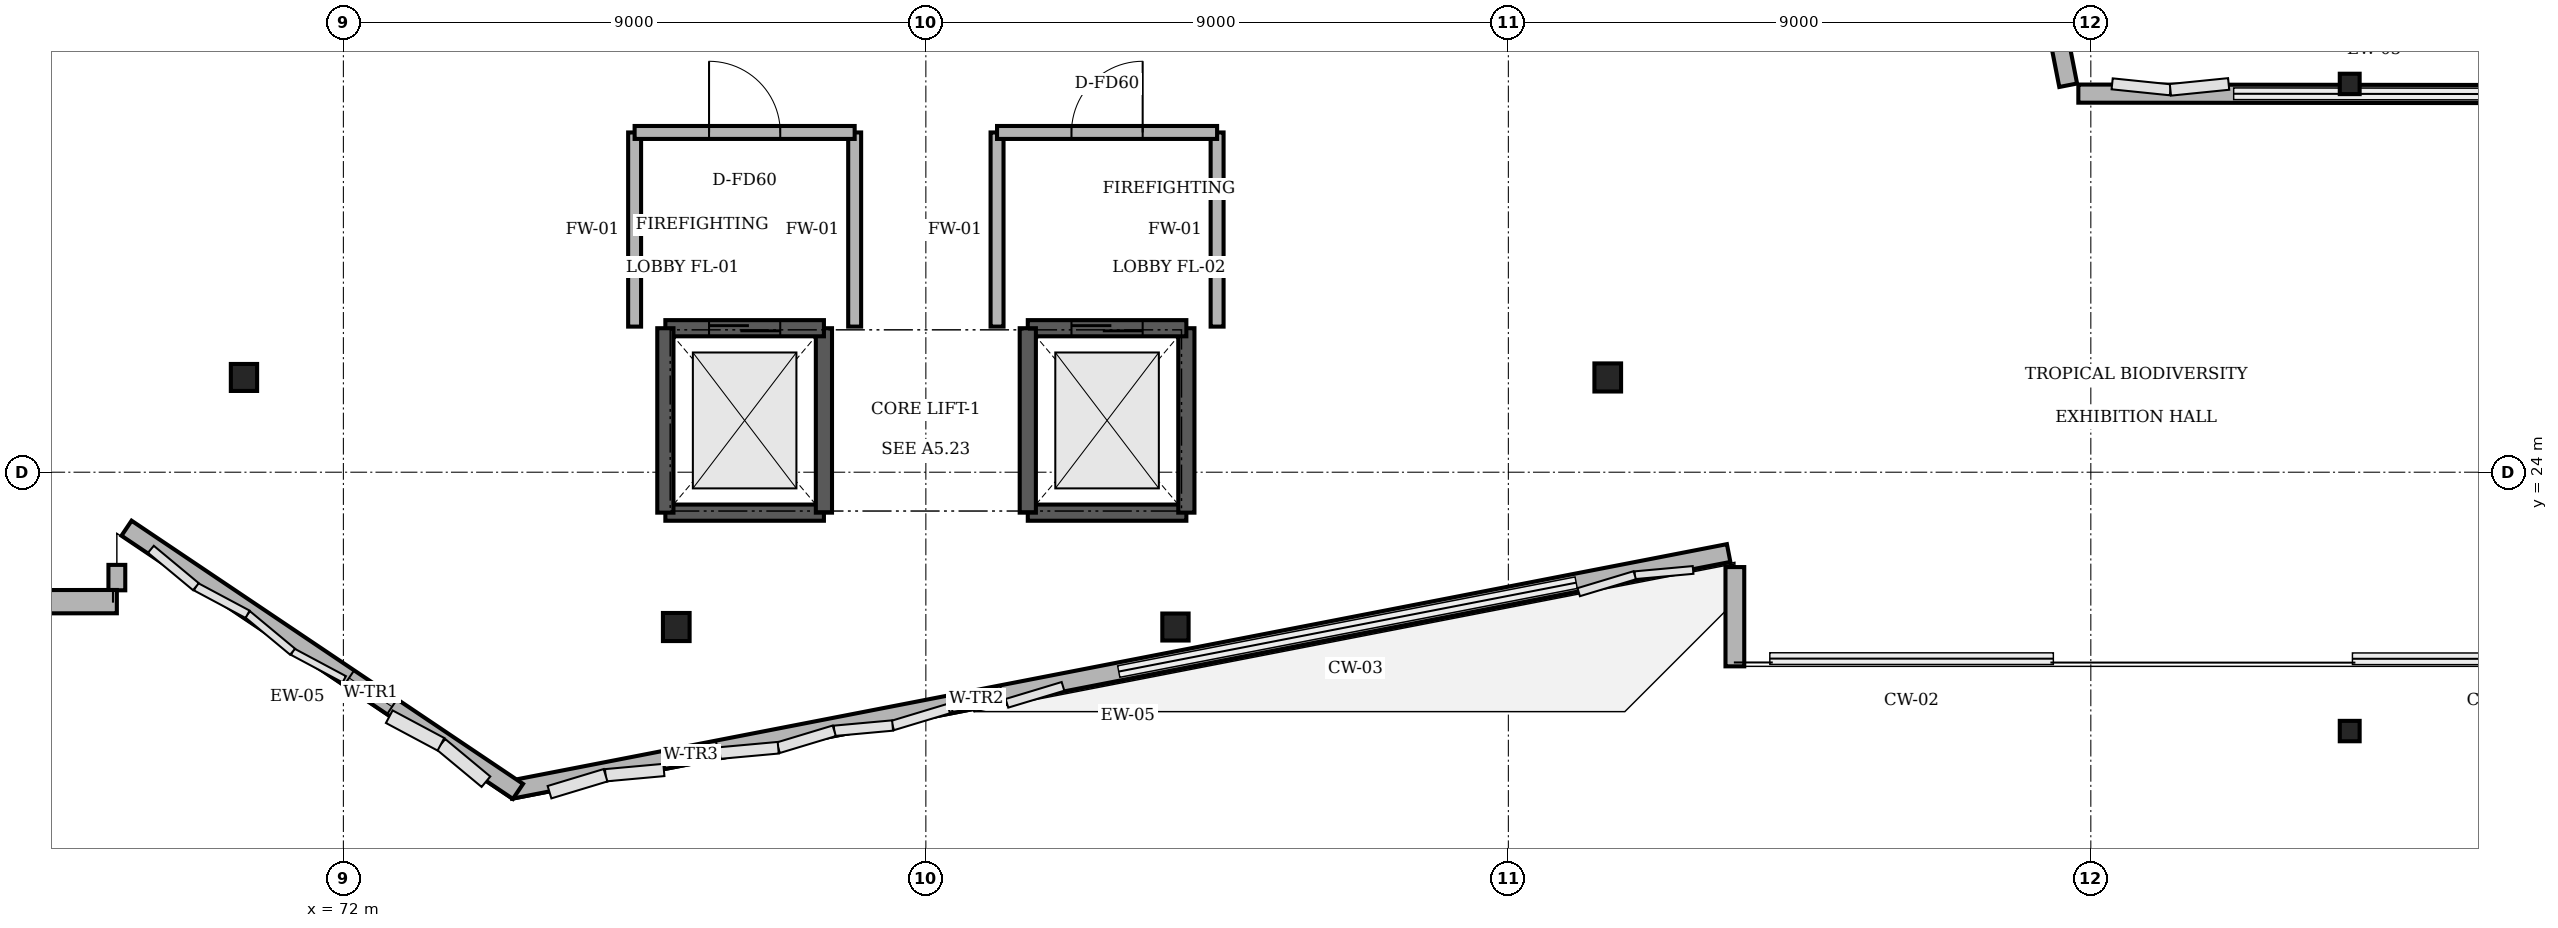
"""IFC4 building model, lengths in metres.
Left out: names, types, materials, properties, quantities, classifications, styles, units other than length and angle.
Written with IfcOpenShell. Run it as: python <this file> out.ifc"""

import sys

from ifc_helpers import new_model, si_unit, direction, frame, frame_2d, origin, origin_2d, place, context, subcontext, project, spatial, rectangle, i_section, extrude, element, fill, save


model = new_model("IFC4")
c1 = context("Model", 3, precision=1e-05, world=origin(), true_north=direction((0.0, 1.0)))
c2 = subcontext(c1, "Body", "Model", "MODEL_VIEW")
j1 = project(units=[si_unit("LENGTHUNIT", "METRE"), si_unit("PLANEANGLEUNIT", "RADIAN")], contexts=[c1])
p1 = place(None, origin())
s1 = spatial("IfcSite", under=j1, at=p1, CompositionType="ELEMENT")
p2 = place(p1, origin())
s2 = spatial("IfcBuilding", under=s1, at=p2, CompositionType="ELEMENT")
p3 = place(p2, frame((0.0, 0.0, 5.4)))
s3 = spatial("IfcBuildingStorey", under=s2, at=p3, CompositionType="ELEMENT", Elevation=5.4)
p4 = place(p3, frame((70.464, 25.464, 0.0), z_axis=(0.0, 0.0, 1.0), x_axis=(1.0, 0.0, 0.0)))
e1 = element("IfcColumn", 1, at=p4, inside=s3, PredefinedType="COLUMN", context=c2, shape_type="SweptSolid", body=[
    extrude(i_section(OverallWidth=0.406, OverallDepth=0.417, WebThickness=0.03, FlangeThickness=0.044, FilletRadius=0.015, at=origin_2d()), origin(), (0.0, 0.0, 1.0), 5.4),
])
p5 = place(p3, frame((77.144, 21.608, 0.0), z_axis=(0.0, 0.0, 1.0), x_axis=(1.0, 0.0, 0.0)))
e2 = element("IfcColumn", 2, at=p5, inside=s3, PredefinedType="COLUMN", context=c2, shape_type="SweptSolid", body=[
    extrude(i_section(OverallWidth=0.412, OverallDepth=0.434, WebThickness=0.036, FlangeThickness=0.044, FilletRadius=0.015, at=origin_2d()), origin(), (0.0, 0.0, 1.0), 5.4),
])
p6 = place(p3, frame((84.856, 21.608, 0.0), z_axis=(0.0, 0.0, 1.0), x_axis=(1.0, 0.0, 0.0)))
e3 = element("IfcColumn", 3, at=p6, inside=s3, PredefinedType="COLUMN", context=c2, shape_type="SweptSolid", body=[
    extrude(i_section(OverallWidth=0.406, OverallDepth=0.417, WebThickness=0.03, FlangeThickness=0.044, FilletRadius=0.015, at=origin_2d()), origin(), (0.0, 0.0, 1.0), 5.4),
])
p7 = place(p3, frame((91.536, 25.464, 0.0), z_axis=(0.0, 0.0, 1.0), x_axis=(1.0, 0.0, 0.0)))
e4 = element("IfcColumn", 4, at=p7, inside=s3, PredefinedType="COLUMN", context=c2, shape_type="SweptSolid", body=[
    extrude(i_section(OverallWidth=0.412, OverallDepth=0.434, WebThickness=0.036, FlangeThickness=0.044, FilletRadius=0.015, at=origin_2d()), origin(), (0.0, 0.0, 1.0), 5.4),
])
for number, where, z_axis, x_axis in (
    (5, (103.0, 20.0, 0.0), (0.0, 0.0, 1.0), (1.0, 0.0, 0.0)),
    (6, (103.0, 30.0, 0.0), (0.0, 0.0, 1.0), (1.0, 0.0, 0.0)),
):
    element("IfcColumn", number, at=place(p3, frame(where, z_axis=z_axis, x_axis=x_axis)), inside=s3, PredefinedType="COLUMN", context=c2, shape_type="SweptSolid", body=[
        extrude(i_section(OverallWidth=0.307, OverallDepth=0.315, WebThickness=0.012, FlangeThickness=0.019, FilletRadius=0.013, at=origin_2d()), origin(), (0.0, 0.0, 1.0), 5.4),
    ])
p8 = place(p3, frame((93.5, 21.0, 0.0), z_axis=(0.0, 0.0, 1.0), x_axis=(0.0, 1.0, 0.0)))
e7 = element("IfcWall", 7, at=p8, inside=s3, PredefinedType="SOLIDWALL", context=c2, shape_type="SweptSolid", body=[
    extrude(rectangle(XDim=1.534, YDim=0.29, at=frame_2d((0.767, 0.0))), origin(), (0.0, 0.0, 1.0), 4.72),
])
p9 = place(p3, frame((93.404, 22.751, 0.0), z_axis=(0.0, 0.0, 1.0), x_axis=(-0.981629234006, -0.190798445867, 0.0)))
e8 = element("IfcWall", 8, at=p9, inside=s3, PredefinedType="SOLIDWALL", context=c2, shape_type="SweptSolid", body=[
    extrude(rectangle(XDim=19.178, YDim=0.28, at=frame_2d((9.589, 0.0))), origin(), (0.0, 0.0, 1.0), 2.45),
])
p10 = place(p9, frame((11.439, 0.0, 0.6)))
e9 = element("IfcOpeningElement", 9, at=p10, cuts=e8, PredefinedType="OPENING", context=c2, shape_type="SweptSolid", body=[
    extrude(rectangle(XDim=0.8, YDim=1.7, at=frame_2d((0.4, 0.85))), frame((0.0, 0.15, 0.0), z_axis=(0.0, -1.0, 0.0), x_axis=(1.0, 0.0, 0.0)), (0.0, 0.0, 1.0), 0.3),
])
p11 = place(p9, frame((15.914, 0.0, 0.6)))
e10 = element("IfcOpeningElement", 10, at=p11, cuts=e8, PredefinedType="OPENING", context=c2, shape_type="SweptSolid", body=[
    extrude(rectangle(XDim=0.85, YDim=1.6, at=frame_2d((0.425, 0.8))), frame((0.0, 0.15, 0.0), z_axis=(0.0, -1.0, 0.0), x_axis=(1.0, 0.0, 0.0)), (0.0, 0.0, 1.0), 0.3),
])
p12 = place(p3, frame((74.698, 19.067, 0.0), z_axis=(0.0, 0.0, 1.0), x_axis=(-0.829822511701, 0.558027417851, 0.0)))
e11 = element("IfcWall", 11, at=p12, inside=s3, PredefinedType="SOLIDWALL", context=c2, shape_type="SweptSolid", body=[
    extrude(rectangle(XDim=7.288, YDim=0.28, at=frame_2d((3.644, 0.0))), origin(), (0.0, 0.0, 1.0), 4.209),
])
p13 = place(p12, frame((2.344, 0.0, 1.05)))
e12 = element("IfcOpeningElement", 12, at=p13, cuts=e11, PredefinedType="OPENING", context=c2, shape_type="SweptSolid", body=[
    extrude(rectangle(XDim=0.8, YDim=1.5, at=frame_2d((0.4, 0.75))), frame((0.0, 0.15, 0.0), z_axis=(0.0, -1.0, 0.0), x_axis=(1.0, 0.0, 0.0)), (0.0, 0.0, 1.0), 0.3),
])
p14 = place(p3, frame((68.5, 22.568, 0.0), z_axis=(0.0, 0.0, 1.0), x_axis=(0.0, -1.0, 0.0)))
e13 = element("IfcWall", 13, at=p14, inside=s3, PredefinedType="SOLIDWALL", context=c2, shape_type="SweptSolid", body=[
    extrude(rectangle(XDim=0.393, YDim=0.26, at=frame_2d((0.196, 0.0))), origin(), (0.0, 0.0, 1.0), 4.72),
])
p15 = place(p3, frame((68.5, 22.0, 0.0), z_axis=(0.0, 0.0, 1.0), x_axis=(-0.999999554131, -0.000944318489, 0.0)))
e14 = element("IfcWall", 14, at=p15, inside=s3, PredefinedType="SOLIDWALL", context=c2, shape_type="SweptSolid", body=[
    extrude(rectangle(XDim=14.478, YDim=0.36, at=frame_2d((7.239, 0.0))), origin(), (0.0, 0.0, 1.0), 4.178),
])
p16 = place(p15, frame((2.494, 0.0, 1.0)))
e15 = element("IfcOpeningElement", 15, at=p16, cuts=e14, PredefinedType="OPENING", context=c2, shape_type="SweptSolid", body=[
    extrude(rectangle(XDim=2.25, YDim=1.6, at=frame_2d((1.125, 0.8))), frame((0.0, 0.19, 0.0), z_axis=(0.0, -1.0, 0.0), x_axis=(1.0, 0.0, 0.0)), (0.0, 0.0, 1.0), 0.38),
])
p17 = place(p3, frame((95.104, 48.132, 0.0), z_axis=(0.0, 0.0, 1.0), x_axis=(0.191745445275, -0.981444692388, 0.0)))
e16 = element("IfcWall", 16, at=p17, inside=s3, PredefinedType="SOLIDWALL", context=c2, shape_type="SweptSolid", body=[
    extrude(rectangle(XDim=18.495, YDim=0.28, at=frame_2d((9.248, 0.0))), origin(), (0.0, 0.0, 1.0), 2.45),
])
p18 = place(p17, frame((11.548, 0.0, 0.6)))
e17 = element("IfcOpeningElement", 17, at=p18, cuts=e16, PredefinedType="OPENING", context=c2, shape_type="SweptSolid", body=[
    extrude(rectangle(XDim=0.8, YDim=1.7, at=frame_2d((0.4, 0.85))), frame((0.0, 0.15, 0.0), z_axis=(0.0, -1.0, 0.0), x_axis=(1.0, 0.0, 0.0)), (0.0, 0.0, 1.0), 0.3),
])
p19 = place(p17, frame((16.023, 0.0, 0.6)))
e18 = element("IfcOpeningElement", 18, at=p19, cuts=e16, PredefinedType="OPENING", context=c2, shape_type="SweptSolid", body=[
    extrude(rectangle(XDim=0.85, YDim=1.6, at=frame_2d((0.425, 0.8))), frame((0.0, 0.15, 0.0), z_axis=(0.0, -1.0, 0.0), x_axis=(1.0, 0.0, 0.0)), (0.0, 0.0, 1.0), 0.3),
])
p20 = place(p3, frame((98.807, 29.85, 0.0), z_axis=(0.0, 0.0, 1.0), x_axis=(0.999999538092, -0.00096115294, 0.0)))
e19 = element("IfcWall", 19, at=p20, inside=s3, PredefinedType="SOLIDWALL", context=c2, shape_type="SweptSolid", body=[
    extrude(rectangle(XDim=9.144, YDim=0.28, at=frame_2d((4.572, 0.0))), origin(), (0.0, 0.0, 1.0), 2.45),
])
p21 = place(p3, frame((76.975, 23.375, 0.0), z_axis=(0.0, 0.0, 1.0), x_axis=(1.0, 0.0, 0.0)))
e20 = element("IfcWall", 20, at=p21, inside=s3, PredefinedType="SOLIDWALL", context=c2, shape_type="SweptSolid", body=[
    extrude(rectangle(XDim=2.45, YDim=0.25, at=frame_2d((1.225, 0.0))), origin(), (0.0, 0.0, 1.0), 5.4),
])
p22 = place(p3, frame((79.425, 23.375, 0.0), z_axis=(0.0, 0.0, 1.0), x_axis=(0.0, 1.0, 0.0)))
e21 = element("IfcWall", 21, at=p22, inside=s3, PredefinedType="SOLIDWALL", context=c2, shape_type="SweptSolid", body=[
    extrude(rectangle(XDim=2.85, YDim=0.25, at=frame_2d((1.425, 0.0))), origin(), (0.0, 0.0, 1.0), 5.4),
])
p23 = place(p3, frame((79.425, 26.225, 0.0), z_axis=(0.0, 0.0, 1.0), x_axis=(-1.0, 0.0, 0.0)))
e22 = element("IfcWall", 22, at=p23, inside=s3, PredefinedType="SOLIDWALL", context=c2, shape_type="SweptSolid", body=[
    extrude(rectangle(XDim=2.45, YDim=0.25, at=frame_2d((1.225, 0.0))), origin(), (0.0, 0.0, 1.0), 5.4),
])
p24 = place(p23, frame((0.675, 0.0, 0.0)))
e23 = element("IfcOpeningElement", 23, at=p24, cuts=e22, PredefinedType="OPENING", context=c2, shape_type="SweptSolid", body=[
    extrude(rectangle(XDim=1.1, YDim=2.2, at=frame_2d((0.55, 1.1))), frame((0.0, 0.135, 0.0), z_axis=(0.0, -1.0, 0.0), x_axis=(1.0, 0.0, 0.0)), (0.0, 0.0, 1.0), 0.27),
])
p25 = place(p3, frame((76.975, 26.225, 0.0), z_axis=(0.0, 0.0, 1.0), x_axis=(0.0, -1.0, 0.0)))
e24 = element("IfcWall", 24, at=p25, inside=s3, PredefinedType="SOLIDWALL", context=c2, shape_type="SweptSolid", body=[
    extrude(rectangle(XDim=2.85, YDim=0.25, at=frame_2d((1.425, 0.0))), origin(), (0.0, 0.0, 1.0), 5.4),
])
for number, where, z_axis, x_axis in (
    (25, (76.5, 26.25, 0.0), (0.0, 0.0, 1.0), (0.0, 1.0, 0.0)),
    (26, (79.9, 26.25, 0.0), (0.0, 0.0, 1.0), (0.0, 1.0, 0.0)),
):
    element("IfcWall", number, at=place(p3, frame(where, z_axis=z_axis, x_axis=x_axis)), inside=s3, PredefinedType="SOLIDWALL", context=c2, shape_type="SweptSolid", body=[
        extrude(rectangle(XDim=3.0, YDim=0.2, at=frame_2d((1.5, 0.0))), origin(), (0.0, 0.0, 1.0), 4.59),
    ])
p26 = place(p3, frame((76.5, 29.25, 0.0), z_axis=(0.0, 0.0, 1.0), x_axis=(1.0, 0.0, 0.0)))
e27 = element("IfcWall", 27, at=p26, inside=s3, PredefinedType="SOLIDWALL", context=c2, shape_type="SweptSolid", body=[
    extrude(rectangle(XDim=3.4, YDim=0.2, at=frame_2d((1.7, 0.0))), origin(), (0.0, 0.0, 1.0), 4.59),
])
p27 = place(p26, frame((1.15, 0.0, 0.0)))
e28 = element("IfcOpeningElement", 28, at=p27, cuts=e27, PredefinedType="OPENING", context=c2, shape_type="SweptSolid", body=[
    extrude(rectangle(XDim=1.1, YDim=2.2, at=frame_2d((0.55, 1.1))), frame((0.0, 0.11, 0.0), z_axis=(0.0, -1.0, 0.0), x_axis=(1.0, 0.0, 0.0)), (0.0, 0.0, 1.0), 0.22),
])
p28 = place(p3, frame((82.575, 23.375, 0.0), z_axis=(0.0, 0.0, 1.0), x_axis=(1.0, 0.0, 0.0)))
e29 = element("IfcWall", 29, at=p28, inside=s3, PredefinedType="SOLIDWALL", context=c2, shape_type="SweptSolid", body=[
    extrude(rectangle(XDim=2.45, YDim=0.25, at=frame_2d((1.225, 0.0))), origin(), (0.0, 0.0, 1.0), 5.4),
])
p29 = place(p3, frame((85.025, 23.375, 0.0), z_axis=(0.0, 0.0, 1.0), x_axis=(0.0, 1.0, 0.0)))
e30 = element("IfcWall", 30, at=p29, inside=s3, PredefinedType="SOLIDWALL", context=c2, shape_type="SweptSolid", body=[
    extrude(rectangle(XDim=2.85, YDim=0.25, at=frame_2d((1.425, 0.0))), origin(), (0.0, 0.0, 1.0), 5.4),
])
p30 = place(p3, frame((85.025, 26.225, 0.0), z_axis=(0.0, 0.0, 1.0), x_axis=(-1.0, 0.0, 0.0)))
e31 = element("IfcWall", 31, at=p30, inside=s3, PredefinedType="SOLIDWALL", context=c2, shape_type="SweptSolid", body=[
    extrude(rectangle(XDim=2.45, YDim=0.25, at=frame_2d((1.225, 0.0))), origin(), (0.0, 0.0, 1.0), 5.4),
])
p31 = place(p30, frame((0.675, 0.0, 0.0)))
e32 = element("IfcOpeningElement", 32, at=p31, cuts=e31, PredefinedType="OPENING", context=c2, shape_type="SweptSolid", body=[
    extrude(rectangle(XDim=1.1, YDim=2.2, at=frame_2d((0.55, 1.1))), frame((0.0, 0.135, 0.0), z_axis=(0.0, -1.0, 0.0), x_axis=(1.0, 0.0, 0.0)), (0.0, 0.0, 1.0), 0.27),
])
p32 = place(p3, frame((82.575, 26.225, 0.0), z_axis=(0.0, 0.0, 1.0), x_axis=(0.0, -1.0, 0.0)))
e33 = element("IfcWall", 33, at=p32, inside=s3, PredefinedType="SOLIDWALL", context=c2, shape_type="SweptSolid", body=[
    extrude(rectangle(XDim=2.85, YDim=0.25, at=frame_2d((1.425, 0.0))), origin(), (0.0, 0.0, 1.0), 5.4),
])
p33 = place(p3, frame((82.1, 26.25, 0.0), z_axis=(0.0, 0.0, 1.0), x_axis=(0.0, 1.0, 0.0)))
e34 = element("IfcWall", 34, at=p33, inside=s3, PredefinedType="SOLIDWALL", context=c2, shape_type="SweptSolid", body=[
    extrude(rectangle(XDim=3.0, YDim=0.2, at=frame_2d((1.5, 0.0))), origin(), (0.0, 0.0, 1.0), 4.204),
])
p34 = place(p3, frame((85.5, 26.25, 0.0), z_axis=(0.0, 0.0, 1.0), x_axis=(0.0, 1.0, 0.0)))
e35 = element("IfcWall", 35, at=p34, inside=s3, PredefinedType="SOLIDWALL", context=c2, shape_type="SweptSolid", body=[
    extrude(rectangle(XDim=3.0, YDim=0.2, at=frame_2d((1.5, 0.0))), origin(), (0.0, 0.0, 1.0), 4.214),
])
p35 = place(p3, frame((82.1, 29.25, 0.0), z_axis=(0.0, 0.0, 1.0), x_axis=(1.0, 0.0, 0.0)))
e36 = element("IfcWall", 36, at=p35, inside=s3, PredefinedType="SOLIDWALL", context=c2, shape_type="SweptSolid", body=[
    extrude(rectangle(XDim=3.4, YDim=0.2, at=frame_2d((1.7, 0.0))), origin(), (0.0, 0.0, 1.0), 4.204),
])
p36 = place(p35, frame((1.15, 0.0, 0.0)))
e37 = element("IfcOpeningElement", 37, at=p36, cuts=e36, PredefinedType="OPENING", context=c2, shape_type="SweptSolid", body=[
    extrude(rectangle(XDim=1.1, YDim=2.2, at=frame_2d((0.55, 1.1))), frame((0.0, 0.11, 0.0), z_axis=(0.0, -1.0, 0.0), x_axis=(1.0, 0.0, 0.0)), (0.0, 0.0, 1.0), 0.22),
])
p37 = place(p10, origin())
e38 = element("IfcWindow", 38, at=p37, inside=s3, PartitioningType="SINGLE_PANEL", PredefinedType="WINDOW", context=c2, shape_type="SweptSolid", body=[
    extrude(rectangle(XDim=0.8, YDim=1.7, at=frame_2d((0.4, 0.85))), frame((0.0, 0.03, 0.0), z_axis=(0.0, -1.0, 0.0), x_axis=(1.0, 0.0, 0.0)), (0.0, 0.0, 1.0), 0.06),
])
fill(e9, e38)
p38 = place(p11, origin())
e39 = element("IfcWindow", 39, at=p38, inside=s3, PartitioningType="SINGLE_PANEL", PredefinedType="WINDOW", context=c2, shape_type="SweptSolid", body=[
    extrude(rectangle(XDim=0.85, YDim=1.6, at=frame_2d((0.425, 0.8))), frame((0.0, 0.03, 0.0), z_axis=(0.0, -1.0, 0.0), x_axis=(1.0, 0.0, 0.0)), (0.0, 0.0, 1.0), 0.06),
])
fill(e10, e39)
p39 = place(p13, origin())
e40 = element("IfcWindow", 40, at=p39, inside=s3, PartitioningType="SINGLE_PANEL", PredefinedType="WINDOW", context=c2, shape_type="SweptSolid", body=[
    extrude(rectangle(XDim=0.8, YDim=1.5, at=frame_2d((0.4, 0.75))), frame((0.0, 0.03, 0.0), z_axis=(0.0, -1.0, 0.0), x_axis=(1.0, 0.0, 0.0)), (0.0, 0.0, 1.0), 0.06),
])
fill(e12, e40)
p40 = place(p24, origin())
e41 = element("IfcDoor", 41, at=p40, inside=s3, OperationType="SLIDING_TO_LEFT", PredefinedType="DOOR", context=c2, shape_type="SweptSolid", body=[
    extrude(rectangle(XDim=1.1, YDim=2.2, at=frame_2d((0.55, 1.1))), frame((0.0, 0.025, 0.0), z_axis=(0.0, -1.0, 0.0), x_axis=(1.0, 0.0, 0.0)), (0.0, 0.0, 1.0), 0.05),
])
fill(e23, e41)
p41 = place(p27, origin())
e42 = element("IfcDoor", 42, at=p41, inside=s3, OperationType="SINGLE_SWING_LEFT", PredefinedType="DOOR", context=c2, shape_type="SweptSolid", body=[
    extrude(rectangle(XDim=1.1, YDim=2.2, at=frame_2d((0.55, 1.1))), frame((0.0, 0.025, 0.0), z_axis=(0.0, -1.0, 0.0), x_axis=(1.0, 0.0, 0.0)), (0.0, 0.0, 1.0), 0.05),
])
fill(e28, e42)
p42 = place(p31, origin())
e43 = element("IfcDoor", 43, at=p42, inside=s3, OperationType="SLIDING_TO_LEFT", PredefinedType="DOOR", context=c2, shape_type="SweptSolid", body=[
    extrude(rectangle(XDim=1.1, YDim=2.2, at=frame_2d((0.55, 1.1))), frame((0.0, 0.025, 0.0), z_axis=(0.0, -1.0, 0.0), x_axis=(1.0, 0.0, 0.0)), (0.0, 0.0, 1.0), 0.05),
])
fill(e32, e43)
p43 = place(p36, origin())
e44 = element("IfcDoor", 44, at=p43, inside=s3, OperationType="SINGLE_SWING_RIGHT", PredefinedType="DOOR", context=c2, shape_type="SweptSolid", body=[
    extrude(rectangle(XDim=1.1, YDim=2.2, at=frame_2d((0.55, 1.1))), frame((0.0, 0.025, 0.0), z_axis=(0.0, -1.0, 0.0), x_axis=(1.0, 0.0, 0.0)), (0.0, 0.0, 1.0), 0.05),
])
fill(e37, e44)
save(model, sys.argv[1])
